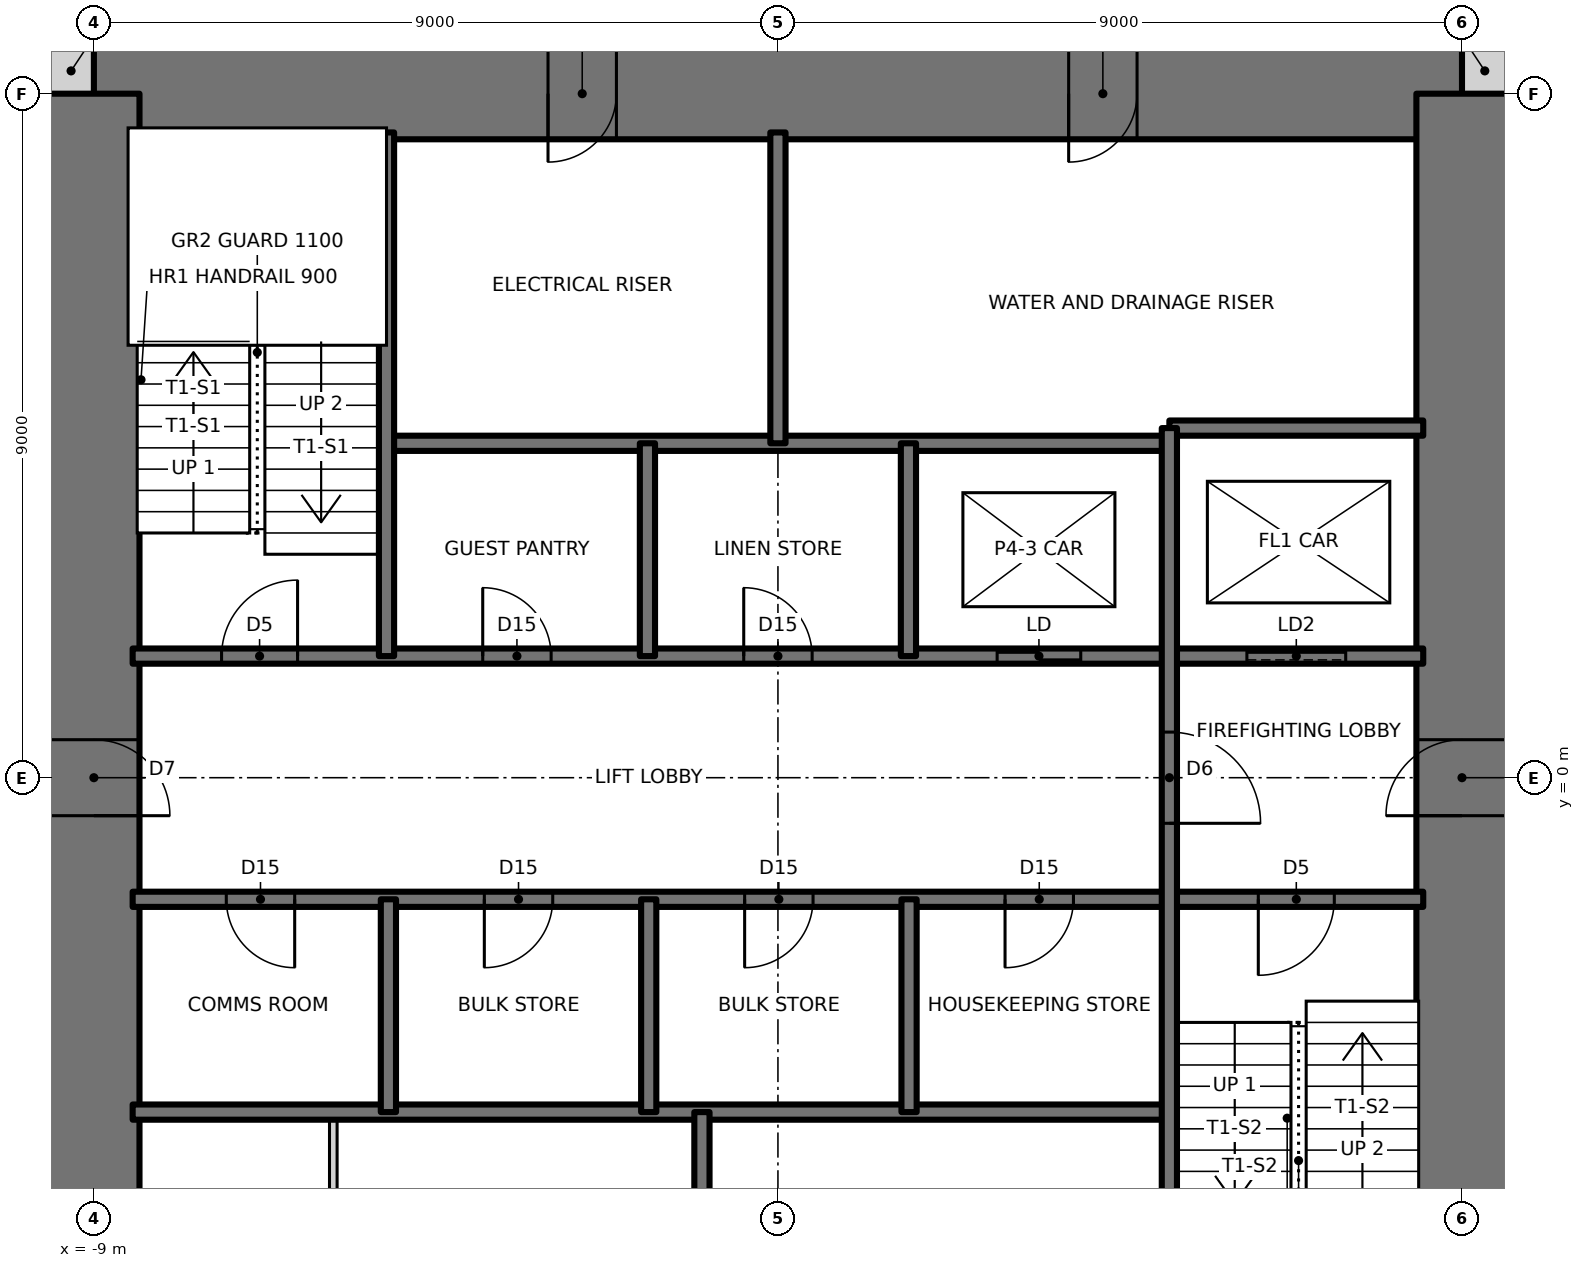
"""IFC4 building model, lengths in metres.
Left out: names, types, materials, properties, quantities, classifications, styles, units other than length and angle.
Written with IfcOpenShell. Run it as: python <this file> out.ifc"""

import sys

from ifc_helpers import new_model, si_unit, direction, frame, frame_2d, origin, place, context, subcontext, project, spatial, rectangle, extrude, element, fill, save


model = new_model("IFC4")
c1 = context("Model", 3, precision=1e-05, world=origin(), true_north=direction((0.0, 1.0)))
c2 = subcontext(c1, "Body", "Model", "MODEL_VIEW")
j1 = project(units=[si_unit("LENGTHUNIT", "METRE"), si_unit("PLANEANGLEUNIT", "RADIAN")], contexts=[c1])
p1 = place(None, origin())
s1 = spatial("IfcSite", under=j1, at=p1, CompositionType="ELEMENT")
p2 = place(p1, origin())
s2 = spatial("IfcBuilding", under=s1, at=p2, CompositionType="ELEMENT")
p3 = place(p2, frame((0.0, 0.0, 253.5)))
s3 = spatial("IfcBuildingStorey", under=s2, at=p3, CompositionType="ELEMENT", Elevation=253.5)
for number, where, z_axis, x_axis in (
    (1, (9.0, 9.3, 0.0), (0.0, 0.0, 1.0), (1.0, 0.0, 0.0)),
    (2, (-9.6, 9.3, 0.0), (0.0, 0.0, 1.0), (1.0, 0.0, 0.0)),
):
    element("IfcWall", number, at=place(p3, frame(where, z_axis=z_axis, x_axis=x_axis)), inside=s3, PredefinedType="SOLIDWALL", context=c2, shape_type="SweptSolid", body=[
        extrude(rectangle(XDim=0.6, YDim=0.6, at=frame_2d((0.3, 0.0))), origin(), (0.0, 0.0, 1.0), 3.5),
    ])
p4 = place(p3, frame((9.0, 9.0, 0.0), z_axis=(0.0, 0.0, 1.0), x_axis=(-1.0, 0.0, 0.0)))
e3 = element("IfcWall", 3, at=p4, inside=s3, PredefinedType="SHEAR", context=c2, shape_type="SweptSolid", body=[
    extrude(rectangle(XDim=18.0, YDim=1.2, at=frame_2d((9.0, 0.0))), origin(), (0.0, 0.0, 1.0), 3.5),
])
p5 = place(p4, frame((11.125, 0.0, 0.0)))
e4 = element("IfcOpeningElement", 4, at=p5, cuts=e3, PredefinedType="OPENING", context=c2, shape_type="SweptSolid", body=[
    extrude(rectangle(XDim=0.9, YDim=2.1, at=frame_2d((0.45, 1.05))), frame((0.0, 0.61, 0.0), z_axis=(0.0, -1.0, 0.0), x_axis=(1.0, 0.0, 0.0)), (0.0, 0.0, 1.0), 1.22),
])
p6 = place(p4, frame((4.275, 0.0, 0.0)))
e5 = element("IfcOpeningElement", 5, at=p6, cuts=e3, PredefinedType="OPENING", context=c2, shape_type="SweptSolid", body=[
    extrude(rectangle(XDim=0.9, YDim=2.1, at=frame_2d((0.45, 1.05))), frame((0.0, 0.61, 0.0), z_axis=(0.0, -1.0, 0.0), x_axis=(1.0, 0.0, 0.0)), (0.0, 0.0, 1.0), 1.22),
])
p7 = place(p3, frame((9.0, -9.0, 0.0), z_axis=(0.0, 0.0, 1.0), x_axis=(0.0, 1.0, 0.0)))
e6 = element("IfcWall", 6, at=p7, inside=s3, PredefinedType="SHEAR", context=c2, shape_type="SweptSolid", body=[
    extrude(rectangle(XDim=18.0, YDim=1.2, at=frame_2d((9.0, 0.0))), origin(), (0.0, 0.0, 1.0), 3.5),
])
p8 = place(p7, frame((8.5, 0.0, 0.0)))
e7 = element("IfcOpeningElement", 7, at=p8, cuts=e6, PredefinedType="OPENING", context=c2, shape_type="SweptSolid", body=[
    extrude(rectangle(XDim=1.0, YDim=2.1, at=frame_2d((0.5, 1.05))), frame((0.0, 0.61, 0.0), z_axis=(0.0, -1.0, 0.0), x_axis=(1.0, 0.0, 0.0)), (0.0, 0.0, 1.0), 1.22),
])
p9 = place(p3, frame((-9.0, 9.0, 0.0), z_axis=(0.0, 0.0, 1.0), x_axis=(0.0, -1.0, 0.0)))
e8 = element("IfcWall", 8, at=p9, inside=s3, PredefinedType="SHEAR", context=c2, shape_type="SweptSolid", body=[
    extrude(rectangle(XDim=18.0, YDim=1.2, at=frame_2d((9.0, 0.0))), origin(), (0.0, 0.0, 1.0), 3.5),
])
p10 = place(p9, frame((8.5, 0.0, 0.0)))
e9 = element("IfcOpeningElement", 9, at=p10, cuts=e8, PredefinedType="OPENING", context=c2, shape_type="SweptSolid", body=[
    extrude(rectangle(XDim=1.0, YDim=2.1, at=frame_2d((0.5, 1.05))), frame((0.0, 0.61, 0.0), z_axis=(0.0, -1.0, 0.0), x_axis=(1.0, 0.0, 0.0)), (0.0, 0.0, 1.0), 1.22),
])
p11 = place(p3, frame((-8.49, -4.4, 0.0), z_axis=(0.0, 0.0, 1.0), x_axis=(1.0, 0.0, 0.0)))
e10 = element("IfcWall", 10, at=p11, inside=s3, PredefinedType="SOLIDWALL", context=c2, shape_type="SweptSolid", body=[
    extrude(rectangle(XDim=13.64, YDim=0.2, at=frame_2d((6.82, 0.0))), origin(), (0.0, 0.0, 1.0), 3.5),
])
p12 = place(p3, frame((-8.49, -1.6, 0.0), z_axis=(0.0, 0.0, 1.0), x_axis=(1.0, 0.0, 0.0)))
e11 = element("IfcWall", 11, at=p12, inside=s3, PredefinedType="SOLIDWALL", context=c2, shape_type="SweptSolid", body=[
    extrude(rectangle(XDim=16.98, YDim=0.2, at=frame_2d((8.49, 0.0))), origin(), (0.0, 0.0, 1.0), 3.5),
])
p13 = place(p12, frame((14.81, 0.0, 0.0)))
e12 = element("IfcOpeningElement", 12, at=p13, cuts=e11, PredefinedType="OPENING", context=c2, shape_type="SweptSolid", body=[
    extrude(rectangle(XDim=1.0, YDim=2.1, at=frame_2d((0.5, 1.05))), frame((0.0, 0.11, 0.0), z_axis=(0.0, -1.0, 0.0), x_axis=(1.0, 0.0, 0.0)), (0.0, 0.0, 1.0), 0.22),
])
p14 = place(p12, frame((1.232, 0.0, 0.0)))
e13 = element("IfcOpeningElement", 13, at=p14, cuts=e11, PredefinedType="OPENING", context=c2, shape_type="SweptSolid", body=[
    extrude(rectangle(XDim=0.9, YDim=2.1, at=frame_2d((0.45, 1.05))), frame((0.0, 0.11, 0.0), z_axis=(0.0, -1.0, 0.0), x_axis=(1.0, 0.0, 0.0)), (0.0, 0.0, 1.0), 0.22),
])
p15 = place(p12, frame((4.627, 0.0, 0.0)))
e14 = element("IfcOpeningElement", 14, at=p15, cuts=e11, PredefinedType="OPENING", context=c2, shape_type="SweptSolid", body=[
    extrude(rectangle(XDim=0.9, YDim=2.1, at=frame_2d((0.45, 1.05))), frame((0.0, 0.11, 0.0), z_axis=(0.0, -1.0, 0.0), x_axis=(1.0, 0.0, 0.0)), (0.0, 0.0, 1.0), 0.22),
])
p16 = place(p12, frame((8.052, 0.0, 0.0)))
e15 = element("IfcOpeningElement", 15, at=p16, cuts=e11, PredefinedType="OPENING", context=c2, shape_type="SweptSolid", body=[
    extrude(rectangle(XDim=0.9, YDim=2.1, at=frame_2d((0.45, 1.05))), frame((0.0, 0.11, 0.0), z_axis=(0.0, -1.0, 0.0), x_axis=(1.0, 0.0, 0.0)), (0.0, 0.0, 1.0), 0.22),
])
p17 = place(p12, frame((11.478, 0.0, 0.0)))
e16 = element("IfcOpeningElement", 16, at=p17, cuts=e11, PredefinedType="OPENING", context=c2, shape_type="SweptSolid", body=[
    extrude(rectangle(XDim=0.9, YDim=2.1, at=frame_2d((0.45, 1.05))), frame((0.0, 0.11, 0.0), z_axis=(0.0, -1.0, 0.0), x_axis=(1.0, 0.0, 0.0)), (0.0, 0.0, 1.0), 0.22),
])
p18 = place(p3, frame((-8.49, 1.6, 0.0), z_axis=(0.0, 0.0, 1.0), x_axis=(1.0, 0.0, 0.0)))
e17 = element("IfcWall", 17, at=p18, inside=s3, PredefinedType="SOLIDWALL", context=c2, shape_type="SweptSolid", body=[
    extrude(rectangle(XDim=16.98, YDim=0.2, at=frame_2d((8.49, 0.0))), origin(), (0.0, 0.0, 1.0), 3.5),
])
p19 = place(p18, frame((1.17, 0.0, 0.0)))
e18 = element("IfcOpeningElement", 18, at=p19, cuts=e17, PredefinedType="OPENING", context=c2, shape_type="SweptSolid", body=[
    extrude(rectangle(XDim=1.0, YDim=2.1, at=frame_2d((0.5, 1.05))), frame((0.0, 0.11, 0.0), z_axis=(0.0, -1.0, 0.0), x_axis=(1.0, 0.0, 0.0)), (0.0, 0.0, 1.0), 0.22),
])
p20 = place(p18, frame((4.606, 0.0, 0.0)))
e19 = element("IfcOpeningElement", 19, at=p20, cuts=e17, PredefinedType="OPENING", context=c2, shape_type="SweptSolid", body=[
    extrude(rectangle(XDim=0.9, YDim=2.1, at=frame_2d((0.45, 1.05))), frame((0.0, 0.11, 0.0), z_axis=(0.0, -1.0, 0.0), x_axis=(1.0, 0.0, 0.0)), (0.0, 0.0, 1.0), 0.22),
])
p21 = place(p18, frame((8.04, 0.0, 0.0)))
e20 = element("IfcOpeningElement", 20, at=p21, cuts=e17, PredefinedType="OPENING", context=c2, shape_type="SweptSolid", body=[
    extrude(rectangle(XDim=0.9, YDim=2.1, at=frame_2d((0.45, 1.05))), frame((0.0, 0.11, 0.0), z_axis=(0.0, -1.0, 0.0), x_axis=(1.0, 0.0, 0.0)), (0.0, 0.0, 1.0), 0.22),
])
p22 = place(p18, frame((11.374, 0.0, 0.0)))
e21 = element("IfcOpeningElement", 21, at=p22, cuts=e17, PredefinedType="OPENING", context=c2, shape_type="SweptSolid", body=[
    extrude(rectangle(XDim=1.1, YDim=2.1, at=frame_2d((0.55, 1.05))), frame((0.0, 0.11, 0.0), z_axis=(0.0, -1.0, 0.0), x_axis=(1.0, 0.0, 0.0)), (0.0, 0.0, 1.0), 0.22),
])
p23 = place(p18, frame((14.66, 0.0, 0.0)))
e22 = element("IfcOpeningElement", 22, at=p23, cuts=e17, PredefinedType="OPENING", context=c2, shape_type="SweptSolid", body=[
    extrude(rectangle(XDim=1.3, YDim=2.1, at=frame_2d((0.65, 1.05))), frame((0.0, 0.11, 0.0), z_axis=(0.0, -1.0, 0.0), x_axis=(1.0, 0.0, 0.0)), (0.0, 0.0, 1.0), 0.22),
])
p24 = place(p3, frame((-5.15, 4.4, 0.0), z_axis=(0.0, 0.0, 1.0), x_axis=(1.0, 0.0, 0.0)))
e23 = element("IfcWall", 23, at=p24, inside=s3, PredefinedType="SOLIDWALL", context=c2, shape_type="SweptSolid", body=[
    extrude(rectangle(XDim=10.3, YDim=0.2, at=frame_2d((5.15, 0.0))), origin(), (0.0, 0.0, 1.0), 3.5),
])
p25 = place(p3, frame((5.15, 4.6, 0.0), z_axis=(0.0, 0.0, 1.0), x_axis=(1.0, 0.0, 0.0)))
e24 = element("IfcWall", 24, at=p25, inside=s3, PredefinedType="SOLIDWALL", context=c2, shape_type="SweptSolid", body=[
    extrude(rectangle(XDim=3.34, YDim=0.2, at=frame_2d((1.67, 0.0))), origin(), (0.0, 0.0, 1.0), 3.5),
])
p26 = place(p3, frame((5.15, -8.49, 0.0), z_axis=(0.0, 0.0, 1.0), x_axis=(0.0, 1.0, 0.0)))
e25 = element("IfcWall", 25, at=p26, inside=s3, PredefinedType="SOLIDWALL", context=c2, shape_type="SweptSolid", body=[
    extrude(rectangle(XDim=13.09, YDim=0.2, at=frame_2d((6.545, 0.0))), origin(), (0.0, 0.0, 1.0), 3.5),
])
p27 = place(p26, frame((7.89, 0.0, 0.0)))
e26 = element("IfcOpeningElement", 26, at=p27, cuts=e25, PredefinedType="OPENING", context=c2, shape_type="SweptSolid", body=[
    extrude(rectangle(XDim=1.2, YDim=2.1, at=frame_2d((0.6, 1.05))), frame((0.0, 0.11, 0.0), z_axis=(0.0, -1.0, 0.0), x_axis=(1.0, 0.0, 0.0)), (0.0, 0.0, 1.0), 0.22),
])
for number, where, z_axis, x_axis in (
    (27, (1.725, -4.4, 0.0), (0.0, 0.0, 1.0), (0.0, 1.0, 0.0)),
    (28, (1.717, 1.6, 0.0), (0.0, 0.0, 1.0), (0.0, 1.0, 0.0)),
):
    element("IfcWall", number, at=place(p3, frame(where, z_axis=z_axis, x_axis=x_axis)), inside=s3, PredefinedType="SOLIDWALL", context=c2, shape_type="SweptSolid", body=[
        extrude(rectangle(XDim=2.8, YDim=0.2, at=frame_2d((1.4, 0.0))), origin(), (0.0, 0.0, 1.0), 3.5),
    ])
for number, where, z_axis, x_axis in (
    (29, (0.0, 4.4, 0.0), (0.0, 0.0, 1.0), (0.0, 1.0, 0.0)),
    (30, (-1.0, -8.49, 0.0), (0.0, 0.0, 1.0), (0.0, 1.0, 0.0)),
):
    element("IfcWall", number, at=place(p3, frame(where, z_axis=z_axis, x_axis=x_axis)), inside=s3, PredefinedType="SOLIDWALL", context=c2, shape_type="SweptSolid", body=[
        extrude(rectangle(XDim=4.09, YDim=0.2, at=frame_2d((2.045, 0.0))), origin(), (0.0, 0.0, 1.0), 3.5),
    ])
for number, where, z_axis, x_axis in (
    (31, (-1.7, -4.4, 0.0), (0.0, 0.0, 1.0), (0.0, 1.0, 0.0)),
    (32, (-1.717, 1.6, 0.0), (0.0, 0.0, 1.0), (0.0, 1.0, 0.0)),
    (33, (-5.125, -4.4, 0.0), (0.0, 0.0, 1.0), (0.0, 1.0, 0.0)),
):
    element("IfcWall", number, at=place(p3, frame(where, z_axis=z_axis, x_axis=x_axis)), inside=s3, PredefinedType="SOLIDWALL", context=c2, shape_type="SweptSolid", body=[
        extrude(rectangle(XDim=2.8, YDim=0.2, at=frame_2d((1.4, 0.0))), origin(), (0.0, 0.0, 1.0), 3.5),
    ])
p28 = place(p3, frame((-5.15, 1.6, 0.0), z_axis=(0.0, 0.0, 1.0), x_axis=(0.0, 1.0, 0.0)))
e34 = element("IfcWall", 34, at=p28, inside=s3, PredefinedType="SOLIDWALL", context=c2, shape_type="SweptSolid", body=[
    extrude(rectangle(XDim=6.89, YDim=0.2, at=frame_2d((3.445, 0.0))), origin(), (0.0, 0.0, 1.0), 3.5),
])
p29 = place(p3, frame((-5.85, -8.49, 0.0), z_axis=(0.0, 0.0, 1.0), x_axis=(0.0, 1.0, 0.0)))
e35 = element("IfcWall", 35, at=p29, inside=s3, PredefinedType="PARTITIONING", context=c2, shape_type="SweptSolid", body=[
    extrude(rectangle(XDim=4.09, YDim=0.1, at=frame_2d((2.045, 0.0))), origin(), (0.0, 0.0, 1.0), 3.3),
])
p30 = place(p29, frame((1.595, 0.0, 0.0)))
e36 = element("IfcOpeningElement", 36, at=p30, cuts=e35, PredefinedType="OPENING", context=c2, shape_type="SweptSolid", body=[
    extrude(rectangle(XDim=0.9, YDim=2.1, at=frame_2d((0.45, 1.05))), frame((0.0, 0.06, 0.0), z_axis=(0.0, -1.0, 0.0), x_axis=(1.0, 0.0, 0.0)), (0.0, 0.0, 1.0), 0.12),
])
p31 = place(p19, origin())
e37 = element("IfcDoor", 37, at=p31, inside=s3, OperationType="SINGLE_SWING_RIGHT", PredefinedType="DOOR", context=c2, shape_type="SweptSolid", body=[
    extrude(rectangle(XDim=1.0, YDim=2.1, at=frame_2d((0.5, 1.05))), frame((0.0, 0.025, 0.0), z_axis=(0.0, -1.0, 0.0), x_axis=(1.0, 0.0, 0.0)), (0.0, 0.0, 1.0), 0.05),
])
fill(e18, e37)
p32 = place(p13, frame((1.0, 0.0, 0.0), z_axis=(0.0, 0.0, 1.0), x_axis=(-1.0, 0.0, 0.0)))
e38 = element("IfcDoor", 38, at=p32, inside=s3, OperationType="SINGLE_SWING_RIGHT", PredefinedType="DOOR", context=c2, shape_type="SweptSolid", body=[
    extrude(rectangle(XDim=1.0, YDim=2.1, at=frame_2d((0.5, 1.05))), frame((0.0, 0.025, 0.0), z_axis=(0.0, -1.0, 0.0), x_axis=(1.0, 0.0, 0.0)), (0.0, 0.0, 1.0), 0.05),
])
fill(e12, e38)
p33 = place(p27, frame((1.2, 0.0, 0.0), z_axis=(0.0, 0.0, 1.0), x_axis=(-1.0, 0.0, 0.0)))
e39 = element("IfcDoor", 39, at=p33, inside=s3, OperationType="SINGLE_SWING_RIGHT", PredefinedType="DOOR", context=c2, shape_type="SweptSolid", body=[
    extrude(rectangle(XDim=1.2, YDim=2.1, at=frame_2d((0.6, 1.05))), frame((0.0, 0.025, 0.0), z_axis=(0.0, -1.0, 0.0), x_axis=(1.0, 0.0, 0.0)), (0.0, 0.0, 1.0), 0.05),
])
fill(e26, e39)
p34 = place(p20, origin())
e40 = element("IfcDoor", 40, at=p34, inside=s3, OperationType="SINGLE_SWING_LEFT", PredefinedType="DOOR", context=c2, shape_type="SweptSolid", body=[
    extrude(rectangle(XDim=0.9, YDim=2.1, at=frame_2d((0.45, 1.05))), frame((0.0, 0.025, 0.0), z_axis=(0.0, -1.0, 0.0), x_axis=(1.0, 0.0, 0.0)), (0.0, 0.0, 1.0), 0.05),
])
fill(e19, e40)
p35 = place(p21, origin())
e41 = element("IfcDoor", 41, at=p35, inside=s3, OperationType="SINGLE_SWING_LEFT", PredefinedType="DOOR", context=c2, shape_type="SweptSolid", body=[
    extrude(rectangle(XDim=0.9, YDim=2.1, at=frame_2d((0.45, 1.05))), frame((0.0, 0.025, 0.0), z_axis=(0.0, -1.0, 0.0), x_axis=(1.0, 0.0, 0.0)), (0.0, 0.0, 1.0), 0.05),
])
fill(e20, e41)
p36 = place(p14, frame((0.9, 0.0, 0.0), z_axis=(0.0, 0.0, 1.0), x_axis=(-1.0, 0.0, 0.0)))
e42 = element("IfcDoor", 42, at=p36, inside=s3, OperationType="SINGLE_SWING_LEFT", PredefinedType="DOOR", context=c2, shape_type="SweptSolid", body=[
    extrude(rectangle(XDim=0.9, YDim=2.1, at=frame_2d((0.45, 1.05))), frame((0.0, 0.025, 0.0), z_axis=(0.0, -1.0, 0.0), x_axis=(1.0, 0.0, 0.0)), (0.0, 0.0, 1.0), 0.05),
])
fill(e13, e42)
p37 = place(p15, frame((0.9, 0.0, 0.0), z_axis=(0.0, 0.0, 1.0), x_axis=(-1.0, 0.0, 0.0)))
e43 = element("IfcDoor", 43, at=p37, inside=s3, OperationType="SINGLE_SWING_RIGHT", PredefinedType="DOOR", context=c2, shape_type="SweptSolid", body=[
    extrude(rectangle(XDim=0.9, YDim=2.1, at=frame_2d((0.45, 1.05))), frame((0.0, 0.025, 0.0), z_axis=(0.0, -1.0, 0.0), x_axis=(1.0, 0.0, 0.0)), (0.0, 0.0, 1.0), 0.05),
])
fill(e14, e43)
p38 = place(p16, frame((0.9, 0.0, 0.0), z_axis=(0.0, 0.0, 1.0), x_axis=(-1.0, 0.0, 0.0)))
e44 = element("IfcDoor", 44, at=p38, inside=s3, OperationType="SINGLE_SWING_RIGHT", PredefinedType="DOOR", context=c2, shape_type="SweptSolid", body=[
    extrude(rectangle(XDim=0.9, YDim=2.1, at=frame_2d((0.45, 1.05))), frame((0.0, 0.025, 0.0), z_axis=(0.0, -1.0, 0.0), x_axis=(1.0, 0.0, 0.0)), (0.0, 0.0, 1.0), 0.05),
])
fill(e15, e44)
p39 = place(p17, frame((0.9, 0.0, 0.0), z_axis=(0.0, 0.0, 1.0), x_axis=(-1.0, 0.0, 0.0)))
e45 = element("IfcDoor", 45, at=p39, inside=s3, OperationType="SINGLE_SWING_RIGHT", PredefinedType="DOOR", context=c2, shape_type="SweptSolid", body=[
    extrude(rectangle(XDim=0.9, YDim=2.1, at=frame_2d((0.45, 1.05))), frame((0.0, 0.025, 0.0), z_axis=(0.0, -1.0, 0.0), x_axis=(1.0, 0.0, 0.0)), (0.0, 0.0, 1.0), 0.05),
])
fill(e16, e45)
p40 = place(p10, origin())
e46 = element("IfcDoor", 46, at=p40, inside=s3, OperationType="SINGLE_SWING_RIGHT", PredefinedType="DOOR", context=c2, shape_type="SweptSolid", body=[
    extrude(rectangle(XDim=1.0, YDim=2.1, at=frame_2d((0.5, 1.05))), frame((0.0, 0.025, 0.0), z_axis=(0.0, -1.0, 0.0), x_axis=(1.0, 0.0, 0.0)), (0.0, 0.0, 1.0), 0.05),
])
fill(e9, e46)
p41 = place(p8, origin())
e47 = element("IfcDoor", 47, at=p41, inside=s3, OperationType="SINGLE_SWING_LEFT", PredefinedType="DOOR", context=c2, shape_type="SweptSolid", body=[
    extrude(rectangle(XDim=1.0, YDim=2.1, at=frame_2d((0.5, 1.05))), frame((0.0, 0.025, 0.0), z_axis=(0.0, -1.0, 0.0), x_axis=(1.0, 0.0, 0.0)), (0.0, 0.0, 1.0), 0.05),
])
fill(e7, e47)
p42 = place(p5, origin())
e48 = element("IfcDoor", 48, at=p42, inside=s3, OperationType="SINGLE_SWING_RIGHT", PredefinedType="DOOR", context=c2, shape_type="SweptSolid", body=[
    extrude(rectangle(XDim=0.9, YDim=2.1, at=frame_2d((0.45, 1.05))), frame((0.0, 0.025, 0.0), z_axis=(0.0, -1.0, 0.0), x_axis=(1.0, 0.0, 0.0)), (0.0, 0.0, 1.0), 0.05),
])
fill(e4, e48)
p43 = place(p6, origin())
e49 = element("IfcDoor", 49, at=p43, inside=s3, OperationType="SINGLE_SWING_RIGHT", PredefinedType="DOOR", context=c2, shape_type="SweptSolid", body=[
    extrude(rectangle(XDim=0.9, YDim=2.1, at=frame_2d((0.45, 1.05))), frame((0.0, 0.025, 0.0), z_axis=(0.0, -1.0, 0.0), x_axis=(1.0, 0.0, 0.0)), (0.0, 0.0, 1.0), 0.05),
])
fill(e5, e49)
p44 = place(p22, origin())
e50 = element("IfcDoor", 50, at=p44, inside=s3, OperationType="DOUBLE_DOOR_SLIDING", PredefinedType="DOOR", context=c2, shape_type="SweptSolid", body=[
    extrude(rectangle(XDim=1.1, YDim=2.1, at=frame_2d((0.55, 1.05))), frame((0.0, 0.025, 0.0), z_axis=(0.0, -1.0, 0.0), x_axis=(1.0, 0.0, 0.0)), (0.0, 0.0, 1.0), 0.05),
])
fill(e21, e50)
p45 = place(p23, origin())
e51 = element("IfcDoor", 51, at=p45, inside=s3, OperationType="SLIDING_TO_LEFT", PredefinedType="DOOR", context=c2, shape_type="SweptSolid", body=[
    extrude(rectangle(XDim=1.3, YDim=2.1, at=frame_2d((0.65, 1.05))), frame((0.0, 0.025, 0.0), z_axis=(0.0, -1.0, 0.0), x_axis=(1.0, 0.0, 0.0)), (0.0, 0.0, 1.0), 0.05),
])
fill(e22, e51)
save(model, sys.argv[1])
